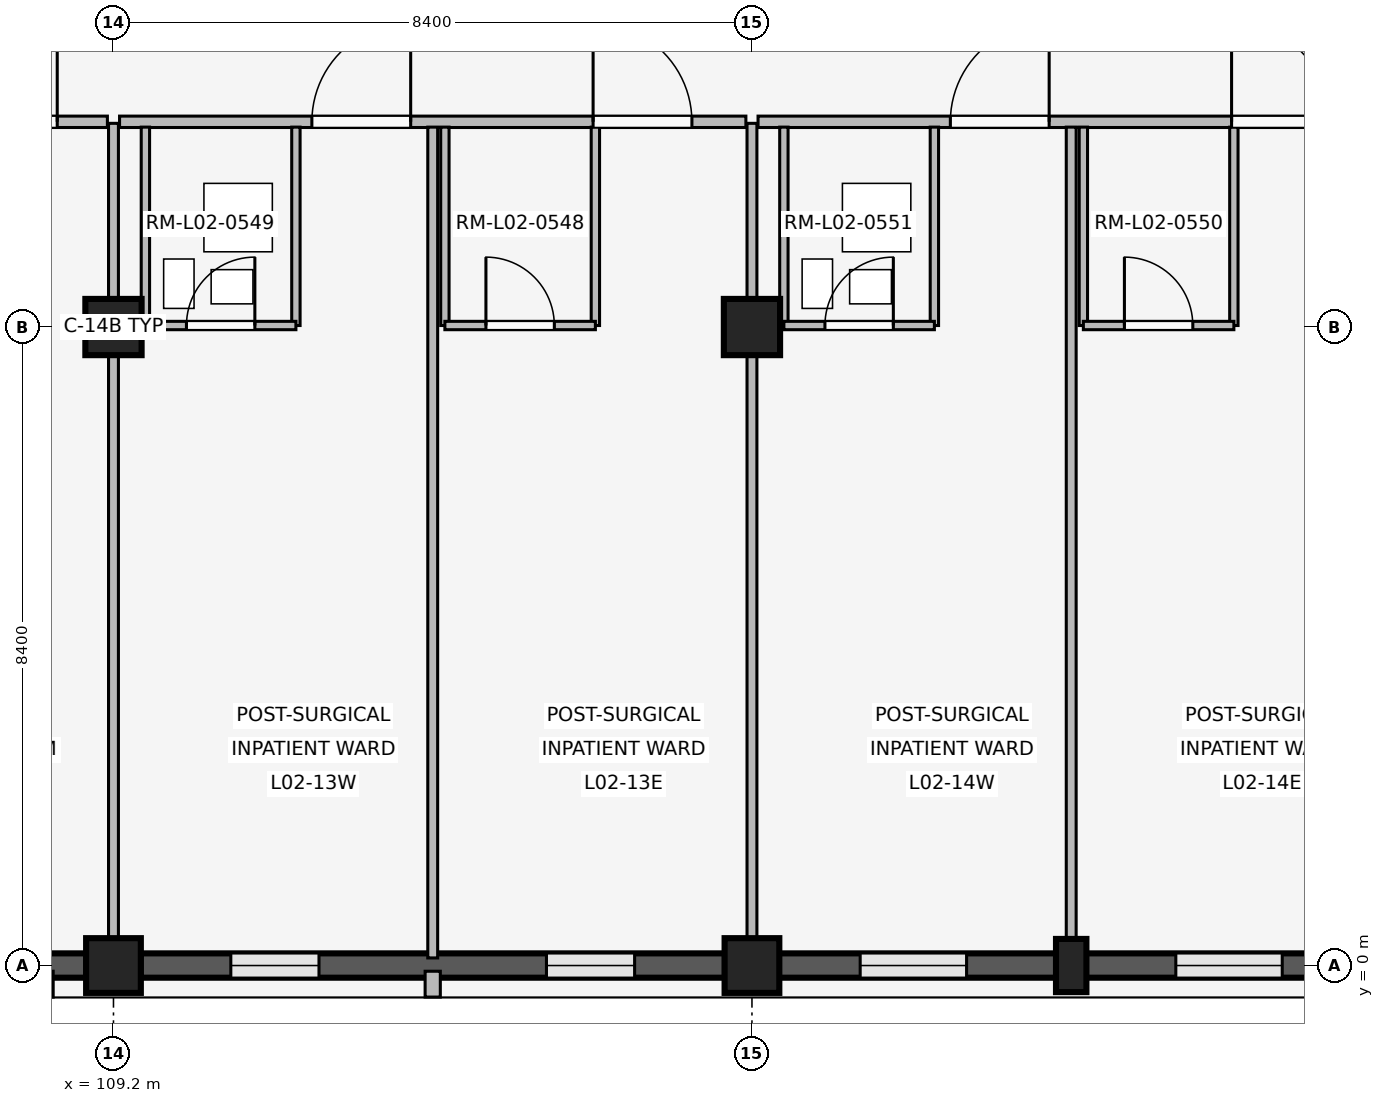
"""IFC4 building model, lengths in metres.
Left out: names, types, materials, properties, quantities, classifications, styles, units other than length and angle.
Written with IfcOpenShell. Run it as: python <this file> out.ifc"""

import sys

from ifc_helpers import new_model, si_unit, direction, frame, frame_2d, origin, origin_2d, place, context, subcontext, project, spatial, rectangle, extrude, element, fill, save


model = new_model("IFC4")
c1 = context("Model", 3, precision=1e-05, world=origin(), true_north=direction((0.0, 1.0)))
c2 = subcontext(c1, "Body", "Model", "MODEL_VIEW")
j1 = project(units=[si_unit("LENGTHUNIT", "METRE"), si_unit("PLANEANGLEUNIT", "RADIAN")], contexts=[c1])
p1 = place(None, origin())
s1 = spatial("IfcSite", under=j1, at=p1, CompositionType="ELEMENT")
p2 = place(p1, origin())
s2 = spatial("IfcBuilding", under=s1, at=p2, CompositionType="ELEMENT")
p3 = place(p2, frame((0.0, 0.0, 8.1)))
s3 = spatial("IfcBuildingStorey", under=s2, at=p3, CompositionType="ELEMENT", Elevation=8.1)
p4 = place(p3, frame((109.2, 0.0, 0.0), z_axis=(0.0, 0.0, 1.0), x_axis=(1.0, 0.0, 0.0)))
e1 = element("IfcColumn", 1, at=p4, inside=s3, PredefinedType="COLUMN", context=c2, shape_type="SweptSolid", body=[
    extrude(rectangle(XDim=0.72, YDim=0.72, at=origin_2d()), origin(), (0.0, 0.0, 1.0), 4.8),
])
p5 = place(p3, frame((109.2, 8.4, 0.0), z_axis=(0.0, 0.0, 1.0), x_axis=(1.0, 0.0, 0.0)))
e2 = element("IfcColumn", 2, at=p5, inside=s3, PredefinedType="COLUMN", context=c2, shape_type="SweptSolid", body=[
    extrude(rectangle(XDim=0.74, YDim=0.74, at=origin_2d()), origin(), (0.0, 0.0, 1.0), 4.8),
])
p6 = place(p3, frame((117.6, 0.0, 0.0), z_axis=(0.0, 0.0, 1.0), x_axis=(1.0, 0.0, 0.0)))
e3 = element("IfcColumn", 3, at=p6, inside=s3, PredefinedType="COLUMN", context=c2, shape_type="SweptSolid", body=[
    extrude(rectangle(XDim=0.72, YDim=0.72, at=origin_2d()), origin(), (0.0, 0.0, 1.0), 4.8),
])
p7 = place(p3, frame((117.6, 8.4, 0.0), z_axis=(0.0, 0.0, 1.0), x_axis=(1.0, 0.0, 0.0)))
e4 = element("IfcColumn", 4, at=p7, inside=s3, PredefinedType="COLUMN", context=c2, shape_type="SweptSolid", body=[
    extrude(rectangle(XDim=0.74, YDim=0.74, at=origin_2d()), origin(), (0.0, 0.0, 1.0), 4.8),
])
p8 = place(p3, frame((121.8, 0.0, 0.0), z_axis=(0.0, 0.0, 1.0), x_axis=(1.0, 0.0, 0.0)))
e5 = element("IfcColumn", 5, at=p8, inside=s3, PredefinedType="PILASTER", context=c2, shape_type="SweptSolid", body=[
    extrude(rectangle(XDim=0.4, YDim=0.7, at=origin_2d()), origin(), (0.0, 0.0, 1.0), 4.8),
])
p9 = place(p3, frame((108.845, 0.0, 0.0), z_axis=(0.0, 0.0, 1.0), x_axis=(-1.0, 0.0, 0.0)))
e6 = element("IfcWall", 6, at=p9, inside=s3, PredefinedType="SOLIDWALL", context=c2, shape_type="SweptSolid", body=[
    extrude(rectangle(XDim=7.69, YDim=0.32, at=frame_2d((3.845, 0.0))), origin(), (0.0, 0.0, 1.0), 3.86),
])
p10 = place(p9, frame((1.139, 0.0, 0.85)))
e7 = element("IfcOpeningElement", 7, at=p10, cuts=e6, PredefinedType="OPENING", context=c2, shape_type="SweptSolid", body=[
    extrude(rectangle(XDim=1.26, YDim=1.52, at=frame_2d((0.63, 0.76))), frame((0.0, 0.17, 0.0), z_axis=(0.0, -1.0, 0.0), x_axis=(1.0, 0.0, 0.0)), (0.0, 0.0, 1.0), 0.34),
])
p11 = place(p9, frame((5.291, 0.0, 0.85)))
e8 = element("IfcOpeningElement", 8, at=p11, cuts=e6, PredefinedType="OPENING", context=c2, shape_type="SweptSolid", body=[
    extrude(rectangle(XDim=1.26, YDim=1.52, at=frame_2d((0.63, 0.76))), frame((0.0, 0.17, 0.0), z_axis=(0.0, -1.0, 0.0), x_axis=(1.0, 0.0, 0.0)), (0.0, 0.0, 1.0), 0.34),
])
p12 = place(p3, frame((108.307, -0.075, 0.0), z_axis=(0.0, 0.0, 1.0), x_axis=(0.0, -1.0, 0.0)))
e9 = element("IfcWall", 9, at=p12, inside=s3, PredefinedType="ELEMENTEDWALL", context=c2, shape_type="SweptSolid", body=[
    extrude(rectangle(XDim=0.34, YDim=0.2, at=frame_2d((0.17, 0.0))), origin(), (0.0, 0.0, 1.0), 3.84),
])
p13 = place(p3, frame((117.245, 0.0, 0.0), z_axis=(0.0, 0.0, 1.0), x_axis=(-1.0, 0.0, 0.0)))
e10 = element("IfcWall", 10, at=p13, inside=s3, PredefinedType="SOLIDWALL", context=c2, shape_type="SweptSolid", body=[
    extrude(rectangle(XDim=7.69, YDim=0.32, at=frame_2d((3.845, 0.0))), origin(), (0.0, 0.0, 1.0), 3.86),
])
p14 = place(p13, frame((1.189, 0.0, 0.85)))
e11 = element("IfcOpeningElement", 11, at=p14, cuts=e10, PredefinedType="OPENING", context=c2, shape_type="SweptSolid", body=[
    extrude(rectangle(XDim=1.16, YDim=1.48, at=frame_2d((0.58, 0.74))), frame((0.0, 0.17, 0.0), z_axis=(0.0, -1.0, 0.0), x_axis=(1.0, 0.0, 0.0)), (0.0, 0.0, 1.0), 0.34),
])
p15 = place(p13, frame((5.341, 0.0, 0.85)))
e12 = element("IfcOpeningElement", 12, at=p15, cuts=e10, PredefinedType="OPENING", context=c2, shape_type="SweptSolid", body=[
    extrude(rectangle(XDim=1.16, YDim=1.48, at=frame_2d((0.58, 0.74))), frame((0.0, 0.17, 0.0), z_axis=(0.0, -1.0, 0.0), x_axis=(1.0, 0.0, 0.0)), (0.0, 0.0, 1.0), 0.34),
])
p16 = place(p3, frame((113.4, -0.075, 0.0), z_axis=(0.0, 0.0, 1.0), x_axis=(0.0, -1.0, 0.0)))
e13 = element("IfcWall", 13, at=p16, inside=s3, PredefinedType="ELEMENTEDWALL", context=c2, shape_type="SweptSolid", body=[
    extrude(rectangle(XDim=0.34, YDim=0.2, at=frame_2d((0.17, 0.0))), origin(), (0.0, 0.0, 1.0), 3.84),
])
p17 = place(p3, frame((125.645, 0.0, 0.0), z_axis=(0.0, 0.0, 1.0), x_axis=(-1.0, 0.0, 0.0)))
e14 = element("IfcWall", 14, at=p17, inside=s3, PredefinedType="SOLIDWALL", context=c2, shape_type="SweptSolid", body=[
    extrude(rectangle(XDim=7.69, YDim=0.32, at=frame_2d((3.845, 0.0))), origin(), (0.0, 0.0, 1.0), 3.86),
])
p18 = place(p17, frame((1.069, 0.0, 0.85)))
e15 = element("IfcOpeningElement", 15, at=p18, cuts=e14, PredefinedType="OPENING", context=c2, shape_type="SweptSolid", body=[
    extrude(rectangle(XDim=1.4, YDim=1.4, at=frame_2d((0.7, 0.7))), frame((0.0, 0.17, 0.0), z_axis=(0.0, -1.0, 0.0), x_axis=(1.0, 0.0, 0.0)), (0.0, 0.0, 1.0), 0.34),
])
p19 = place(p17, frame((5.221, 0.0, 0.85)))
e16 = element("IfcOpeningElement", 16, at=p19, cuts=e14, PredefinedType="OPENING", context=c2, shape_type="SweptSolid", body=[
    extrude(rectangle(XDim=1.4, YDim=1.4, at=frame_2d((0.7, 0.7))), frame((0.0, 0.17, 0.0), z_axis=(0.0, -1.0, 0.0), x_axis=(1.0, 0.0, 0.0)), (0.0, 0.0, 1.0), 0.34),
])
p20 = place(p3, frame((101.16, 11.1, 0.0), z_axis=(0.0, 0.0, 1.0), x_axis=(1.0, 0.0, 0.0)))
e17 = element("IfcWall", 17, at=p20, inside=s3, PredefinedType="PARTITIONING", context=c2, shape_type="SweptSolid", body=[
    extrude(rectangle(XDim=7.96, YDim=0.15, at=frame_2d((3.98, 0.0))), origin(), (0.0, 0.0, 1.0), 3.84),
])
p21 = place(p20, frame((2.25, 0.0, 0.0)))
e18 = element("IfcOpeningElement", 18, at=p21, cuts=e17, PredefinedType="OPENING", context=c2, shape_type="SweptSolid", body=[
    extrude(rectangle(XDim=1.35, YDim=2.25, at=frame_2d((0.675, 1.125))), frame((0.0, 0.085, 0.0), z_axis=(0.0, -1.0, 0.0), x_axis=(1.0, 0.0, 0.0)), (0.0, 0.0, 1.0), 0.17),
])
p22 = place(p20, frame((5.95, 0.0, 0.0)))
e19 = element("IfcOpeningElement", 19, at=p22, cuts=e17, PredefinedType="OPENING", context=c2, shape_type="SweptSolid", body=[
    extrude(rectangle(XDim=1.35, YDim=2.25, at=frame_2d((0.675, 1.125))), frame((0.0, 0.085, 0.0), z_axis=(0.0, -1.0, 0.0), x_axis=(1.0, 0.0, 0.0)), (0.0, 0.0, 1.0), 0.17),
])
p23 = place(p3, frame((109.2, 0.14, 0.0), z_axis=(0.0, 0.0, 1.0), x_axis=(0.0, 1.0, 0.0)))
e20 = element("IfcWall", 20, at=p23, inside=s3, PredefinedType="PARTITIONING", context=c2, shape_type="SweptSolid", body=[
    extrude(rectangle(XDim=10.94, YDim=0.13, at=frame_2d((5.47, 0.0))), origin(), (0.0, 0.0, 1.0), 3.84),
])
p24 = place(p3, frame((109.28, 11.1, 0.0), z_axis=(0.0, 0.0, 1.0), x_axis=(1.0, 0.0, 0.0)))
e21 = element("IfcWall", 21, at=p24, inside=s3, PredefinedType="PARTITIONING", context=c2, shape_type="SweptSolid", body=[
    extrude(rectangle(XDim=8.24, YDim=0.15, at=frame_2d((4.12, 0.0))), origin(), (0.0, 0.0, 1.0), 3.84),
])
p25 = place(p24, frame((2.53, 0.0, 0.0)))
e22 = element("IfcOpeningElement", 22, at=p25, cuts=e21, PredefinedType="OPENING", context=c2, shape_type="SweptSolid", body=[
    extrude(rectangle(XDim=1.3, YDim=2.25, at=frame_2d((0.65, 1.125))), frame((0.0, 0.085, 0.0), z_axis=(0.0, -1.0, 0.0), x_axis=(1.0, 0.0, 0.0)), (0.0, 0.0, 1.0), 0.17),
])
p26 = place(p24, frame((6.23, 0.0, 0.0)))
e23 = element("IfcOpeningElement", 23, at=p26, cuts=e21, PredefinedType="OPENING", context=c2, shape_type="SweptSolid", body=[
    extrude(rectangle(XDim=1.3, YDim=2.25, at=frame_2d((0.65, 1.125))), frame((0.0, 0.085, 0.0), z_axis=(0.0, -1.0, 0.0), x_axis=(1.0, 0.0, 0.0)), (0.0, 0.0, 1.0), 0.17),
])
p27 = place(p3, frame((113.4, 0.1, 0.0), z_axis=(0.0, 0.0, 1.0), x_axis=(0.0, 1.0, 0.0)))
e24 = element("IfcWall", 24, at=p27, inside=s3, PredefinedType="PARTITIONING", context=c2, shape_type="SweptSolid", body=[
    extrude(rectangle(XDim=10.93, YDim=0.13, at=frame_2d((5.465, 0.0))), origin(), (0.0, 0.0, 1.0), 3.84),
])
for number, where, z_axis, x_axis in (
    (25, (109.62, 8.42, 0.0), (0.0, 0.0, 1.0), (0.0, 1.0, 0.0)),
    (26, (111.6, 8.42, 0.0), (0.0, 0.0, 1.0), (0.0, 1.0, 0.0)),
):
    element("IfcWall", number, at=place(p3, frame(where, z_axis=z_axis, x_axis=x_axis)), inside=s3, PredefinedType="PARTITIONING", context=c2, shape_type="SweptSolid", body=[
        extrude(rectangle(XDim=2.61, YDim=0.11, at=frame_2d((1.305, 0.0))), origin(), (0.0, 0.0, 1.0), 3.84),
    ])
p28 = place(p3, frame((109.62, 8.42, 0.0), z_axis=(0.0, 0.0, 1.0), x_axis=(1.0, 0.0, 0.0)))
e27 = element("IfcWall", 27, at=p28, inside=s3, PredefinedType="PARTITIONING", context=c2, shape_type="SweptSolid", body=[
    extrude(rectangle(XDim=1.98, YDim=0.11, at=frame_2d((0.99, 0.0))), origin(), (0.0, 0.0, 1.0), 3.84),
])
p29 = place(p28, frame((0.54, 0.0, 0.0)))
e28 = element("IfcOpeningElement", 28, at=p29, cuts=e27, PredefinedType="OPENING", context=c2, shape_type="SweptSolid", body=[
    extrude(rectangle(XDim=0.9, YDim=2.1, at=frame_2d((0.45, 1.05))), frame((0.0, 0.065, 0.0), z_axis=(0.0, -1.0, 0.0), x_axis=(1.0, 0.0, 0.0)), (0.0, 0.0, 1.0), 0.13),
])
for number, where, z_axis, x_axis in (
    (29, (113.56, 8.42, 0.0), (0.0, 0.0, 1.0), (0.0, 1.0, 0.0)),
    (30, (115.54, 8.42, 0.0), (0.0, 0.0, 1.0), (0.0, 1.0, 0.0)),
):
    element("IfcWall", number, at=place(p3, frame(where, z_axis=z_axis, x_axis=x_axis)), inside=s3, PredefinedType="PARTITIONING", context=c2, shape_type="SweptSolid", body=[
        extrude(rectangle(XDim=2.61, YDim=0.11, at=frame_2d((1.305, 0.0))), origin(), (0.0, 0.0, 1.0), 3.84),
    ])
p30 = place(p3, frame((113.56, 8.42, 0.0), z_axis=(0.0, 0.0, 1.0), x_axis=(1.0, 0.0, 0.0)))
e31 = element("IfcWall", 31, at=p30, inside=s3, PredefinedType="PARTITIONING", context=c2, shape_type="SweptSolid", body=[
    extrude(rectangle(XDim=1.98, YDim=0.11, at=frame_2d((0.99, 0.0))), origin(), (0.0, 0.0, 1.0), 3.84),
])
p31 = place(p30, frame((0.54, 0.0, 0.0)))
e32 = element("IfcOpeningElement", 32, at=p31, cuts=e31, PredefinedType="OPENING", context=c2, shape_type="SweptSolid", body=[
    extrude(rectangle(XDim=0.9, YDim=2.1, at=frame_2d((0.45, 1.05))), frame((0.0, 0.065, 0.0), z_axis=(0.0, -1.0, 0.0), x_axis=(1.0, 0.0, 0.0)), (0.0, 0.0, 1.0), 0.13),
])
p32 = place(p3, frame((117.6, 0.14, 0.0), z_axis=(0.0, 0.0, 1.0), x_axis=(0.0, 1.0, 0.0)))
e33 = element("IfcWall", 33, at=p32, inside=s3, PredefinedType="PARTITIONING", context=c2, shape_type="SweptSolid", body=[
    extrude(rectangle(XDim=10.94, YDim=0.13, at=frame_2d((5.47, 0.0))), origin(), (0.0, 0.0, 1.0), 3.84),
])
p33 = place(p3, frame((117.68, 11.1, 0.0), z_axis=(0.0, 0.0, 1.0), x_axis=(1.0, 0.0, 0.0)))
e34 = element("IfcWall", 34, at=p33, inside=s3, PredefinedType="PARTITIONING", context=c2, shape_type="SweptSolid", body=[
    extrude(rectangle(XDim=8.24, YDim=0.15, at=frame_2d((4.12, 0.0))), origin(), (0.0, 0.0, 1.0), 3.84),
])
p34 = place(p33, frame((2.53, 0.0, 0.0)))
e35 = element("IfcOpeningElement", 35, at=p34, cuts=e34, PredefinedType="OPENING", context=c2, shape_type="SweptSolid", body=[
    extrude(rectangle(XDim=1.3, YDim=2.25, at=frame_2d((0.65, 1.125))), frame((0.0, 0.085, 0.0), z_axis=(0.0, -1.0, 0.0), x_axis=(1.0, 0.0, 0.0)), (0.0, 0.0, 1.0), 0.17),
])
p35 = place(p33, frame((6.23, 0.0, 0.0)))
e36 = element("IfcOpeningElement", 36, at=p35, cuts=e34, PredefinedType="OPENING", context=c2, shape_type="SweptSolid", body=[
    extrude(rectangle(XDim=1.3, YDim=2.25, at=frame_2d((0.65, 1.125))), frame((0.0, 0.085, 0.0), z_axis=(0.0, -1.0, 0.0), x_axis=(1.0, 0.0, 0.0)), (0.0, 0.0, 1.0), 0.17),
])
p36 = place(p3, frame((121.8, 0.1, 0.0), z_axis=(0.0, 0.0, 1.0), x_axis=(0.0, 1.0, 0.0)))
e37 = element("IfcWall", 37, at=p36, inside=s3, PredefinedType="PARTITIONING", context=c2, shape_type="SweptSolid", body=[
    extrude(rectangle(XDim=10.93, YDim=0.13, at=frame_2d((5.465, 0.0))), origin(), (0.0, 0.0, 1.0), 3.84),
])
for number, where, z_axis, x_axis in (
    (38, (118.02, 8.42, 0.0), (0.0, 0.0, 1.0), (0.0, 1.0, 0.0)),
    (39, (120.0, 8.42, 0.0), (0.0, 0.0, 1.0), (0.0, 1.0, 0.0)),
):
    element("IfcWall", number, at=place(p3, frame(where, z_axis=z_axis, x_axis=x_axis)), inside=s3, PredefinedType="PARTITIONING", context=c2, shape_type="SweptSolid", body=[
        extrude(rectangle(XDim=2.61, YDim=0.11, at=frame_2d((1.305, 0.0))), origin(), (0.0, 0.0, 1.0), 3.84),
    ])
p37 = place(p3, frame((118.02, 8.42, 0.0), z_axis=(0.0, 0.0, 1.0), x_axis=(1.0, 0.0, 0.0)))
e40 = element("IfcWall", 40, at=p37, inside=s3, PredefinedType="PARTITIONING", context=c2, shape_type="SweptSolid", body=[
    extrude(rectangle(XDim=1.98, YDim=0.11, at=frame_2d((0.99, 0.0))), origin(), (0.0, 0.0, 1.0), 3.84),
])
p38 = place(p37, frame((0.54, 0.0, 0.0)))
e41 = element("IfcOpeningElement", 41, at=p38, cuts=e40, PredefinedType="OPENING", context=c2, shape_type="SweptSolid", body=[
    extrude(rectangle(XDim=0.9, YDim=2.1, at=frame_2d((0.45, 1.05))), frame((0.0, 0.065, 0.0), z_axis=(0.0, -1.0, 0.0), x_axis=(1.0, 0.0, 0.0)), (0.0, 0.0, 1.0), 0.13),
])
for number, where, z_axis, x_axis in (
    (42, (121.96, 8.42, 0.0), (0.0, 0.0, 1.0), (0.0, 1.0, 0.0)),
    (43, (123.94, 8.42, 0.0), (0.0, 0.0, 1.0), (0.0, 1.0, 0.0)),
):
    element("IfcWall", number, at=place(p3, frame(where, z_axis=z_axis, x_axis=x_axis)), inside=s3, PredefinedType="PARTITIONING", context=c2, shape_type="SweptSolid", body=[
        extrude(rectangle(XDim=2.61, YDim=0.11, at=frame_2d((1.305, 0.0))), origin(), (0.0, 0.0, 1.0), 3.84),
    ])
p39 = place(p3, frame((121.96, 8.42, 0.0), z_axis=(0.0, 0.0, 1.0), x_axis=(1.0, 0.0, 0.0)))
e44 = element("IfcWall", 44, at=p39, inside=s3, PredefinedType="PARTITIONING", context=c2, shape_type="SweptSolid", body=[
    extrude(rectangle(XDim=1.98, YDim=0.11, at=frame_2d((0.99, 0.0))), origin(), (0.0, 0.0, 1.0), 3.84),
])
p40 = place(p39, frame((0.54, 0.0, 0.0)))
e45 = element("IfcOpeningElement", 45, at=p40, cuts=e44, PredefinedType="OPENING", context=c2, shape_type="SweptSolid", body=[
    extrude(rectangle(XDim=0.9, YDim=2.1, at=frame_2d((0.45, 1.05))), frame((0.0, 0.065, 0.0), z_axis=(0.0, -1.0, 0.0), x_axis=(1.0, 0.0, 0.0)), (0.0, 0.0, 1.0), 0.13),
])
p41 = place(p14, origin())
e46 = element("IfcWindow", 46, at=p41, inside=s3, PartitioningType="SINGLE_PANEL", PredefinedType="WINDOW", context=c2, shape_type="SweptSolid", body=[
    extrude(rectangle(XDim=1.16, YDim=1.48, at=frame_2d((0.58, 0.74))), frame((0.0, 0.03, 0.0), z_axis=(0.0, -1.0, 0.0), x_axis=(1.0, 0.0, 0.0)), (0.0, 0.0, 1.0), 0.06),
])
fill(e11, e46)
p42 = place(p15, origin())
e47 = element("IfcWindow", 47, at=p42, inside=s3, PartitioningType="SINGLE_PANEL", PredefinedType="WINDOW", context=c2, shape_type="SweptSolid", body=[
    extrude(rectangle(XDim=1.16, YDim=1.48, at=frame_2d((0.58, 0.74))), frame((0.0, 0.03, 0.0), z_axis=(0.0, -1.0, 0.0), x_axis=(1.0, 0.0, 0.0)), (0.0, 0.0, 1.0), 0.06),
])
fill(e12, e47)
p43 = place(p18, origin())
e48 = element("IfcWindow", 48, at=p43, inside=s3, PartitioningType="SINGLE_PANEL", PredefinedType="WINDOW", context=c2, shape_type="SweptSolid", body=[
    extrude(rectangle(XDim=1.4, YDim=1.4, at=frame_2d((0.7, 0.7))), frame((0.0, 0.03, 0.0), z_axis=(0.0, -1.0, 0.0), x_axis=(1.0, 0.0, 0.0)), (0.0, 0.0, 1.0), 0.06),
])
fill(e15, e48)
p44 = place(p19, origin())
e49 = element("IfcWindow", 49, at=p44, inside=s3, PartitioningType="SINGLE_PANEL", PredefinedType="WINDOW", context=c2, shape_type="SweptSolid", body=[
    extrude(rectangle(XDim=1.4, YDim=1.4, at=frame_2d((0.7, 0.7))), frame((0.0, 0.03, 0.0), z_axis=(0.0, -1.0, 0.0), x_axis=(1.0, 0.0, 0.0)), (0.0, 0.0, 1.0), 0.06),
])
fill(e16, e49)
p45 = place(p22, origin())
e50 = element("IfcDoor", 50, at=p45, inside=s3, OperationType="SINGLE_SWING_RIGHT", PredefinedType="DOOR", context=c2, shape_type="SweptSolid", body=[
    extrude(rectangle(XDim=1.35, YDim=2.25, at=frame_2d((0.675, 1.125))), frame((0.0, 0.025, 0.0), z_axis=(0.0, -1.0, 0.0), x_axis=(1.0, 0.0, 0.0)), (0.0, 0.0, 1.0), 0.05),
])
fill(e19, e50)
p46 = place(p25, origin())
e51 = element("IfcDoor", 51, at=p46, inside=s3, OperationType="SINGLE_SWING_RIGHT", PredefinedType="DOOR", context=c2, shape_type="SweptSolid", body=[
    extrude(rectangle(XDim=1.3, YDim=2.25, at=frame_2d((0.65, 1.125))), frame((0.0, 0.025, 0.0), z_axis=(0.0, -1.0, 0.0), x_axis=(1.0, 0.0, 0.0)), (0.0, 0.0, 1.0), 0.05),
])
fill(e22, e51)
p47 = place(p26, origin())
e52 = element("IfcDoor", 52, at=p47, inside=s3, OperationType="SINGLE_SWING_LEFT", PredefinedType="DOOR", context=c2, shape_type="SweptSolid", body=[
    extrude(rectangle(XDim=1.3, YDim=2.25, at=frame_2d((0.65, 1.125))), frame((0.0, 0.025, 0.0), z_axis=(0.0, -1.0, 0.0), x_axis=(1.0, 0.0, 0.0)), (0.0, 0.0, 1.0), 0.05),
])
fill(e23, e52)
p48 = place(p29, origin())
e53 = element("IfcDoor", 53, at=p48, inside=s3, OperationType="SINGLE_SWING_RIGHT", PredefinedType="DOOR", context=c2, shape_type="SweptSolid", body=[
    extrude(rectangle(XDim=0.9, YDim=2.1, at=frame_2d((0.45, 1.05))), frame((0.0, 0.025, 0.0), z_axis=(0.0, -1.0, 0.0), x_axis=(1.0, 0.0, 0.0)), (0.0, 0.0, 1.0), 0.05),
])
fill(e28, e53)
p49 = place(p31, origin())
e54 = element("IfcDoor", 54, at=p49, inside=s3, OperationType="SINGLE_SWING_LEFT", PredefinedType="DOOR", context=c2, shape_type="SweptSolid", body=[
    extrude(rectangle(XDim=0.9, YDim=2.1, at=frame_2d((0.45, 1.05))), frame((0.0, 0.025, 0.0), z_axis=(0.0, -1.0, 0.0), x_axis=(1.0, 0.0, 0.0)), (0.0, 0.0, 1.0), 0.05),
])
fill(e32, e54)
p50 = place(p34, origin())
e55 = element("IfcDoor", 55, at=p50, inside=s3, OperationType="SINGLE_SWING_RIGHT", PredefinedType="DOOR", context=c2, shape_type="SweptSolid", body=[
    extrude(rectangle(XDim=1.3, YDim=2.25, at=frame_2d((0.65, 1.125))), frame((0.0, 0.025, 0.0), z_axis=(0.0, -1.0, 0.0), x_axis=(1.0, 0.0, 0.0)), (0.0, 0.0, 1.0), 0.05),
])
fill(e35, e55)
p51 = place(p35, origin())
e56 = element("IfcDoor", 56, at=p51, inside=s3, OperationType="SINGLE_SWING_LEFT", PredefinedType="DOOR", context=c2, shape_type="SweptSolid", body=[
    extrude(rectangle(XDim=1.3, YDim=2.25, at=frame_2d((0.65, 1.125))), frame((0.0, 0.025, 0.0), z_axis=(0.0, -1.0, 0.0), x_axis=(1.0, 0.0, 0.0)), (0.0, 0.0, 1.0), 0.05),
])
fill(e36, e56)
p52 = place(p38, origin())
e57 = element("IfcDoor", 57, at=p52, inside=s3, OperationType="SINGLE_SWING_RIGHT", PredefinedType="DOOR", context=c2, shape_type="SweptSolid", body=[
    extrude(rectangle(XDim=0.9, YDim=2.1, at=frame_2d((0.45, 1.05))), frame((0.0, 0.025, 0.0), z_axis=(0.0, -1.0, 0.0), x_axis=(1.0, 0.0, 0.0)), (0.0, 0.0, 1.0), 0.05),
])
fill(e41, e57)
p53 = place(p40, origin())
e58 = element("IfcDoor", 58, at=p53, inside=s3, OperationType="SINGLE_SWING_LEFT", PredefinedType="DOOR", context=c2, shape_type="SweptSolid", body=[
    extrude(rectangle(XDim=0.9, YDim=2.1, at=frame_2d((0.45, 1.05))), frame((0.0, 0.025, 0.0), z_axis=(0.0, -1.0, 0.0), x_axis=(1.0, 0.0, 0.0)), (0.0, 0.0, 1.0), 0.05),
])
fill(e45, e58)
save(model, sys.argv[1])
